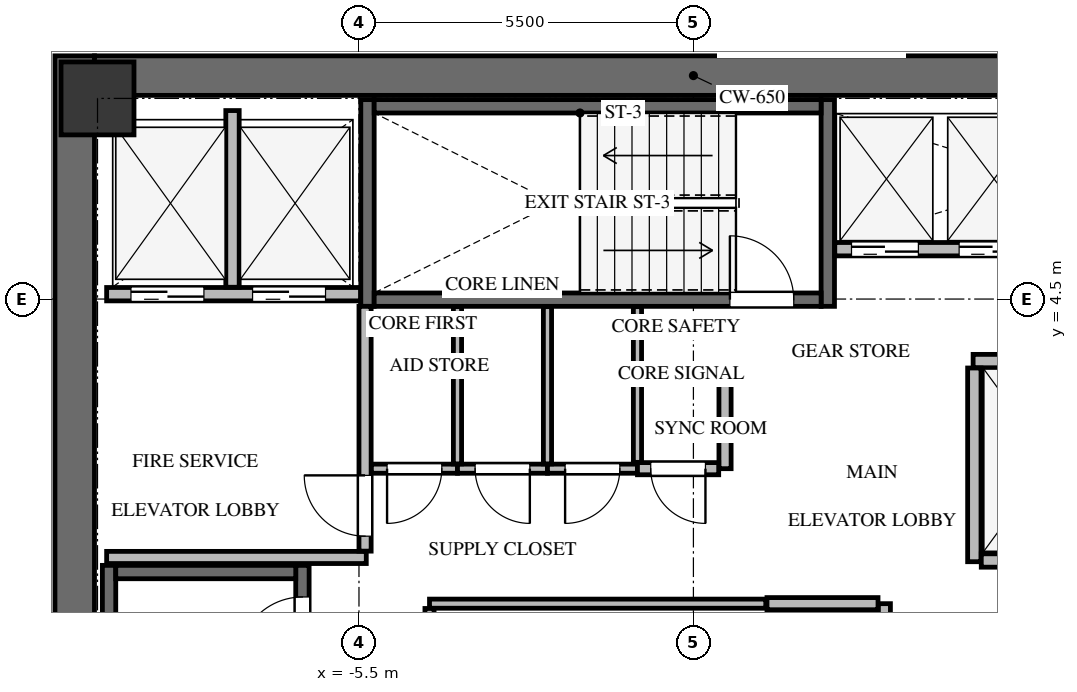
"""IFC4 building model, lengths in metres.
Left out: names, types, materials, properties, quantities, classifications, styles, units other than length and angle.
Written with IfcOpenShell. Run it as: python <this file> out.ifc"""

import sys

from ifc_helpers import new_model, si_unit, direction, frame, frame_2d, origin, origin_2d, place, context, subcontext, project, spatial, rectangle, extrude, source, transform, mapped, element, fill, save


model = new_model("IFC4")
c1 = context("Model", 3, precision=1e-05, world=origin(), true_north=direction((0.0, 1.0)))
c2 = subcontext(c1, "Body", "Model", "MODEL_VIEW")
j1 = project(units=[si_unit("LENGTHUNIT", "METRE"), si_unit("PLANEANGLEUNIT", "RADIAN")], contexts=[c1])
p1 = place(None, origin())
s1 = spatial("IfcSite", under=j1, at=p1, CompositionType="ELEMENT")
p2 = place(p1, origin())
s2 = spatial("IfcBuilding", under=s1, at=p2, CompositionType="ELEMENT")
p3 = place(p2, frame((0.0, 0.0, 167.2)))
s3 = spatial("IfcBuildingStorey", under=s2, at=p3, CompositionType="ELEMENT", Elevation=167.2)
p4 = place(p3, frame((-10.175, -8.5, 0.0), z_axis=(0.0, 0.0, 1.0), x_axis=(0.0, 1.0, 0.0)))
e1 = element("IfcWall", 1, at=p4, inside=s3, PredefinedType="SHEAR", context=c2, shape_type="SweptSolid", body=[
    extrude(rectangle(XDim=17.0, YDim=0.65, at=frame_2d((8.5, 0.0))), origin(), (0.0, 0.0, 1.0), 3.3),
])
p5 = place(p3, frame((-9.85, 8.175, 0.0), z_axis=(0.0, 0.0, 1.0), x_axis=(1.0, 0.0, 0.0)))
e2 = element("IfcWall", 2, at=p5, inside=s3, PredefinedType="SHEAR", context=c2, shape_type="SweptSolid", body=[
    extrude(rectangle(XDim=19.7, YDim=0.65, at=frame_2d((9.85, 0.0))), origin(), (0.0, 0.0, 1.0), 3.3),
])
p6 = place(p3, frame((-6.43, -7.77, -0.24), z_axis=(0.0, 0.0, 1.0), x_axis=(0.0, 1.0, 0.0)))
e3 = element("IfcWall", 3, at=p6, inside=s3, PredefinedType="SHEAR", context=c2, shape_type="SweptSolid", body=[
    extrude(rectangle(XDim=7.89, YDim=0.22, at=frame_2d((3.945, 0.0))), origin(), (0.0, 0.0, 1.0), 3.3),
])
p7 = place(p6, frame((6.32, 0.0, 0.0)))
e4 = element("IfcOpeningElement", 4, at=p7, cuts=e3, PredefinedType="OPENING", context=c2, shape_type="SweptSolid", body=[
    extrude(rectangle(XDim=1.05, YDim=2.15, at=frame_2d((0.525, 1.075))), frame((0.0, 0.12, 0.0), z_axis=(0.0, -1.0, 0.0), x_axis=(1.0, 0.0, 0.0)), (0.0, 0.0, 1.0), 0.24),
])
p8 = place(p3, frame((-9.61, 0.12, -0.24), z_axis=(0.0, 0.0, 1.0), x_axis=(0.0, -1.0, 0.0)))
e5 = element("IfcWall", 5, at=p8, inside=s3, PredefinedType="SHEAR", context=c2, shape_type="SweptSolid", body=[
    extrude(rectangle(XDim=7.89, YDim=0.22, at=frame_2d((3.945, 0.0))), origin(), (0.0, 0.0, 1.0), 3.3),
])
p9 = place(p3, frame((-6.54, 0.01, -0.24), z_axis=(0.0, 0.0, 1.0), x_axis=(-1.0, 0.0, 0.0)))
e6 = element("IfcWall", 6, at=p9, inside=s3, PredefinedType="SHEAR", context=c2, shape_type="SweptSolid", body=[
    extrude(rectangle(XDim=2.96, YDim=0.22, at=frame_2d((1.48, 0.0))), origin(), (0.0, 0.0, 1.0), 3.3),
])
for number, where, z_axis, x_axis in (
    (7, (2.21, 4.38, -0.24), (0.0, 0.0, 1.0), (0.0, 1.0, 0.0)),
    (8, (-5.36, 7.78, -0.24), (0.0, 0.0, 1.0), (0.0, -1.0, 0.0)),
):
    element("IfcWall", number, at=place(p3, frame(where, z_axis=z_axis, x_axis=x_axis)), inside=s3, PredefinedType="SHEAR", context=c2, shape_type="SweptSolid", body=[
        extrude(rectangle(XDim=3.4, YDim=0.22, at=frame_2d((1.7, 0.0))), origin(), (0.0, 0.0, 1.0), 3.3),
    ])
p10 = place(p3, frame((-5.25, 4.49, -0.24), z_axis=(0.0, 0.0, 1.0), x_axis=(1.0, 0.0, 0.0)))
e9 = element("IfcWall", 9, at=p10, inside=s3, PredefinedType="SHEAR", context=c2, shape_type="SweptSolid", body=[
    extrude(rectangle(XDim=7.35, YDim=0.22, at=frame_2d((3.675, 0.0))), origin(), (0.0, 0.0, 1.0), 3.3),
])
p11 = place(p10, frame((5.85, 0.0, 0.0)))
e10 = element("IfcOpeningElement", 10, at=p11, cuts=e9, PredefinedType="OPENING", context=c2, shape_type="SweptSolid", body=[
    extrude(rectangle(XDim=1.05, YDim=2.15, at=frame_2d((0.525, 1.075))), frame((0.0, 0.12, 0.0), z_axis=(0.0, -1.0, 0.0), x_axis=(1.0, 0.0, 0.0)), (0.0, 0.0, 1.0), 0.24),
])
p12 = place(p3, frame((2.1, 7.67, -0.24), z_axis=(0.0, 0.0, 1.0), x_axis=(-1.0, 0.0, 0.0)))
e11 = element("IfcWall", 11, at=p12, inside=s3, PredefinedType="SHEAR", context=c2, shape_type="SweptSolid", body=[
    extrude(rectangle(XDim=7.35, YDim=0.22, at=frame_2d((3.675, 0.0))), origin(), (0.0, 0.0, 1.0), 3.3),
])
m1 = source(origin(), c2, "Body", "SweptSolid", [
    extrude(rectangle(XDim=1.2, YDim=1.2, at=origin_2d()), origin(), (0.0, 0.0, 1.0), 3.3),
])
p13 = place(p3, frame((-9.8, 7.8, -0.24), z_axis=(0.0, 0.0, 1.0), x_axis=(1.0, 0.0, 0.0)))
e12 = element("IfcColumn", 12, at=p13, inside=s3, PredefinedType="COLUMN", context=c2, shape_type="MappedRepresentation", body=[
    mapped(m1, transform((0.0, 0.0, 0.0), x_axis=(1.0, 0.0, 0.0), y_axis=(0.0, 1.0, 0.0), z_axis=(0.0, 0.0, 1.0), scale=1.0)),
])
p14 = place(p3, frame((-9.65, 4.58, 0.0), z_axis=(0.0, 0.0, 1.0), x_axis=(1.0, 0.0, 0.0)))
e13 = element("IfcWall", 13, at=p14, inside=s3, PredefinedType="SOLIDWALL", context=c2, shape_type="SweptSolid", body=[
    extrude(rectangle(XDim=4.175, YDim=0.22, at=frame_2d((2.087, 0.0))), origin(), (0.0, 0.0, 1.0), 3.045),
])
p15 = place(p14, frame((0.4, 0.0, 0.0)))
e14 = element("IfcOpeningElement", 14, at=p15, cuts=e13, PredefinedType="OPENING", context=c2, shape_type="SweptSolid", body=[
    extrude(rectangle(XDim=1.2, YDim=2.15, at=frame_2d((0.6, 1.075))), frame((0.0, 0.12, 0.0), z_axis=(0.0, -1.0, 0.0), x_axis=(1.0, 0.0, 0.0)), (0.0, 0.0, 1.0), 0.24),
])
p16 = place(p14, frame((2.4, 0.0, 0.0)))
e15 = element("IfcOpeningElement", 15, at=p16, cuts=e13, PredefinedType="OPENING", context=c2, shape_type="SweptSolid", body=[
    extrude(rectangle(XDim=1.2, YDim=2.15, at=frame_2d((0.6, 1.075))), frame((0.0, 0.12, 0.0), z_axis=(0.0, -1.0, 0.0), x_axis=(1.0, 0.0, 0.0)), (0.0, 0.0, 1.0), 0.24),
])
p17 = place(p3, frame((-7.58, 4.694, 0.0), z_axis=(0.0, 0.0, 1.0), x_axis=(0.0, 1.0, 0.0)))
e16 = element("IfcWall", 16, at=p17, inside=s3, PredefinedType="SOLIDWALL", context=c2, shape_type="SweptSolid", body=[
    extrude(rectangle(XDim=2.906, YDim=0.22, at=frame_2d((1.453, 0.0))), origin(), (0.0, 0.0, 1.0), 3.045),
])
p18 = place(p3, frame((-9.65, 0.25, 0.0), z_axis=(0.0, 0.0, 1.0), x_axis=(1.0, 0.0, 0.0)))
e17 = element("IfcWall", 17, at=p18, inside=s3, PredefinedType="SOLIDWALL", context=c2, shape_type="SweptSolid", body=[
    extrude(rectangle(XDim=4.27, YDim=0.2, at=frame_2d((2.135, 0.0))), origin(), (0.0, 0.0, 1.0), 3.045),
])
p19 = place(p3, frame((-5.4, 0.354, 0.0), z_axis=(0.0, 0.0, 1.0), x_axis=(0.0, 1.0, 0.0)))
e18 = element("IfcWall", 18, at=p19, inside=s3, PredefinedType="SOLIDWALL", context=c2, shape_type="SweptSolid", body=[
    extrude(rectangle(XDim=4.026, YDim=0.2, at=frame_2d((2.013, 0.0))), origin(), (0.0, 0.0, 1.0), 3.045),
])
p20 = place(p19, frame((0.246, 0.0, 0.0)))
e19 = element("IfcOpeningElement", 19, at=p20, cuts=e18, PredefinedType="OPENING", context=c2, shape_type="SweptSolid", body=[
    extrude(rectangle(XDim=1.0, YDim=2.15, at=frame_2d((0.5, 1.075))), frame((0.0, 0.11, 0.0), z_axis=(0.0, -1.0, 0.0), x_axis=(1.0, 0.0, 0.0)), (0.0, 0.0, 1.0), 0.22),
])
p21 = place(p3, frame((4.6, 3.48, 0.0), z_axis=(0.0, 0.0, 1.0), x_axis=(1.0, 0.0, 0.0)))
e20 = element("IfcWall", 20, at=p21, inside=s3, PredefinedType="SOLIDWALL", context=c2, shape_type="SweptSolid", body=[
    extrude(rectangle(XDim=5.05, YDim=0.22, at=frame_2d((2.525, 0.0))), origin(), (0.0, 0.0, 1.0), 3.045),
])
p22 = place(p21, frame((0.55, 0.0, 0.0)))
e21 = element("IfcOpeningElement", 21, at=p22, cuts=e20, PredefinedType="OPENING", context=c2, shape_type="SweptSolid", body=[
    extrude(rectangle(XDim=1.4, YDim=2.15, at=frame_2d((0.7, 1.075))), frame((0.0, 0.12, 0.0), z_axis=(0.0, -1.0, 0.0), x_axis=(1.0, 0.0, 0.0)), (0.0, 0.0, 1.0), 0.24),
])
p23 = place(p21, frame((3.05, 0.0, 0.0)))
e22 = element("IfcOpeningElement", 22, at=p23, cuts=e20, PredefinedType="OPENING", context=c2, shape_type="SweptSolid", body=[
    extrude(rectangle(XDim=1.4, YDim=2.15, at=frame_2d((0.7, 1.075))), frame((0.0, 0.12, 0.0), z_axis=(0.0, -1.0, 0.0), x_axis=(1.0, 0.0, 0.0)), (0.0, 0.0, 1.0), 0.24),
])
p24 = place(p3, frame((4.62, 0.18, 0.0), z_axis=(0.0, 0.0, 1.0), x_axis=(0.0, 1.0, 0.0)))
e23 = element("IfcWall", 23, at=p24, inside=s3, PredefinedType="SOLIDWALL", context=c2, shape_type="SweptSolid", body=[
    extrude(rectangle(XDim=3.186, YDim=0.22, at=frame_2d((1.593, 0.0))), origin(), (0.0, 0.0, 1.0), 3.045),
])
p25 = place(p3, frame((4.734, 0.2, 0.0), z_axis=(0.0, 0.0, 1.0), x_axis=(1.0, 0.0, 0.0)))
e24 = element("IfcWall", 24, at=p25, inside=s3, PredefinedType="SOLIDWALL", context=c2, shape_type="SweptSolid", body=[
    extrude(rectangle(XDim=1.666, YDim=0.22, at=frame_2d((0.833, 0.0))), origin(), (0.0, 0.0, 1.0), 3.045),
])
p26 = place(p3, frame((2.325, 5.32, 0.0), z_axis=(0.0, 0.0, 1.0), x_axis=(1.0, 0.0, 0.0)))
e25 = element("IfcWall", 25, at=p26, inside=s3, PredefinedType="SOLIDWALL", context=c2, shape_type="SweptSolid", body=[
    extrude(rectangle(XDim=7.325, YDim=0.22, at=frame_2d((3.663, 0.0))), origin(), (0.0, 0.0, 1.0), 3.045),
])
p27 = place(p26, frame((0.275, 0.0, 0.0)))
e26 = element("IfcOpeningElement", 26, at=p27, cuts=e25, PredefinedType="OPENING", context=c2, shape_type="SweptSolid", body=[
    extrude(rectangle(XDim=1.1, YDim=2.15, at=frame_2d((0.55, 1.075))), frame((0.0, 0.12, 0.0), z_axis=(0.0, -1.0, 0.0), x_axis=(1.0, 0.0, 0.0)), (0.0, 0.0, 1.0), 0.24),
])
p28 = place(p26, frame((2.045, 0.0, 0.0)))
e27 = element("IfcOpeningElement", 27, at=p28, cuts=e25, PredefinedType="OPENING", context=c2, shape_type="SweptSolid", body=[
    extrude(rectangle(XDim=1.1, YDim=2.15, at=frame_2d((0.55, 1.075))), frame((0.0, 0.12, 0.0), z_axis=(0.0, -1.0, 0.0), x_axis=(1.0, 0.0, 0.0)), (0.0, 0.0, 1.0), 0.24),
])
p29 = place(p26, frame((3.815, 0.0, 0.0)))
e28 = element("IfcOpeningElement", 28, at=p29, cuts=e25, PredefinedType="OPENING", context=c2, shape_type="SweptSolid", body=[
    extrude(rectangle(XDim=1.1, YDim=2.15, at=frame_2d((0.55, 1.075))), frame((0.0, 0.12, 0.0), z_axis=(0.0, -1.0, 0.0), x_axis=(1.0, 0.0, 0.0)), (0.0, 0.0, 1.0), 0.24),
])
p30 = place(p26, frame((5.585, 0.0, 0.0)))
e29 = element("IfcOpeningElement", 29, at=p30, cuts=e25, PredefinedType="OPENING", context=c2, shape_type="SweptSolid", body=[
    extrude(rectangle(XDim=1.1, YDim=2.15, at=frame_2d((0.55, 1.075))), frame((0.0, 0.12, 0.0), z_axis=(0.0, -1.0, 0.0), x_axis=(1.0, 0.0, 0.0)), (0.0, 0.0, 1.0), 0.24),
])
p31 = place(p3, frame((-4.34, -0.51, 0.0), z_axis=(0.0, 0.0, 1.0), x_axis=(1.0, 0.0, 0.0)))
e30 = element("IfcWall", 30, at=p31, inside=s3, PredefinedType="PARTITIONING", context=c2, shape_type="SweptSolid", body=[
    extrude(rectangle(XDim=5.53, YDim=0.15, at=frame_2d((2.765, 0.0))), origin(), (0.0, 0.0, 1.0), 3.045),
])
p32 = place(p3, frame((-4.34, -2.961, 0.0), z_axis=(0.0, 0.0, 1.0), x_axis=(0.0, 1.0, 0.0)))
e31 = element("IfcWall", 31, at=p32, inside=s3, PredefinedType="PARTITIONING", context=c2, shape_type="SweptSolid", body=[
    extrude(rectangle(XDim=2.372, YDim=0.15, at=frame_2d((1.186, 0.0))), origin(), (0.0, 0.0, 1.0), 3.045),
])
p33 = place(p3, frame((3.14, -0.51, 0.0), z_axis=(0.0, 0.0, 1.0), x_axis=(0.0, -1.0, 0.0)))
e32 = element("IfcWall", 32, at=p33, inside=s3, PredefinedType="SOLIDWALL", context=c2, shape_type="SweptSolid", body=[
    extrude(rectangle(XDim=2.53, YDim=0.2, at=frame_2d((1.265, 0.0))), origin(), (0.0, 0.0, 1.0), 3.045),
])
p34 = place(p33, frame((0.815, 0.0, 0.0)))
e33 = element("IfcOpeningElement", 33, at=p34, cuts=e32, PredefinedType="OPENING", context=c2, shape_type="SweptSolid", body=[
    extrude(rectangle(XDim=0.9, YDim=2.05, at=frame_2d((0.45, 1.025))), frame((0.0, 0.11, 0.0), z_axis=(0.0, -1.0, 0.0), x_axis=(1.0, 0.0, 0.0)), (0.0, 0.0, 1.0), 0.22),
])
p35 = place(p3, frame((1.21, -0.51, 0.0), z_axis=(0.0, 0.0, 1.0), x_axis=(1.0, 0.0, 0.0)))
e34 = element("IfcWall", 34, at=p35, inside=s3, PredefinedType="SOLIDWALL", context=c2, shape_type="SweptSolid", body=[
    extrude(rectangle(XDim=1.826, YDim=0.2, at=frame_2d((0.913, 0.0))), origin(), (0.0, 0.0, 1.0), 3.045),
])
p36 = place(p3, frame((-3.88, 1.71, 0.0), z_axis=(0.0, 0.0, 1.0), x_axis=(-1.0, 0.0, 0.0)))
e35 = element("IfcWall", 35, at=p36, inside=s3, PredefinedType="PARTITIONING", context=c2, shape_type="SweptSolid", body=[
    extrude(rectangle(XDim=1.416, YDim=0.15, at=frame_2d((0.708, 0.0))), origin(), (0.0, 0.0, 1.0), 3.045),
])
p37 = place(p36, frame((0.258, 0.0, 0.0)))
e36 = element("IfcOpeningElement", 36, at=p37, cuts=e35, PredefinedType="OPENING", context=c2, shape_type="SweptSolid", body=[
    extrude(rectangle(XDim=0.9, YDim=2.05, at=frame_2d((0.45, 1.025))), frame((0.0, 0.085, 0.0), z_axis=(0.0, -1.0, 0.0), x_axis=(1.0, 0.0, 0.0)), (0.0, 0.0, 1.0), 0.17),
])
p38 = place(p3, frame((-2.4, 1.71, 0.0), z_axis=(0.0, 0.0, 1.0), x_axis=(-1.0, 0.0, 0.0)))
e37 = element("IfcWall", 37, at=p38, inside=s3, PredefinedType="PARTITIONING", context=c2, shape_type="SweptSolid", body=[
    extrude(rectangle(XDim=1.48, YDim=0.15, at=frame_2d((0.74, 0.0))), origin(), (0.0, 0.0, 1.0), 3.045),
])
p39 = place(p38, frame((0.29, 0.0, 0.0)))
e38 = element("IfcOpeningElement", 38, at=p39, cuts=e37, PredefinedType="OPENING", context=c2, shape_type="SweptSolid", body=[
    extrude(rectangle(XDim=0.9, YDim=2.05, at=frame_2d((0.45, 1.025))), frame((0.0, 0.085, 0.0), z_axis=(0.0, -1.0, 0.0), x_axis=(1.0, 0.0, 0.0)), (0.0, 0.0, 1.0), 0.17),
])
p40 = place(p3, frame((-0.92, 1.71, 0.0), z_axis=(0.0, 0.0, 1.0), x_axis=(-1.0, 0.0, 0.0)))
e39 = element("IfcWall", 39, at=p40, inside=s3, PredefinedType="PARTITIONING", context=c2, shape_type="SweptSolid", body=[
    extrude(rectangle(XDim=1.48, YDim=0.15, at=frame_2d((0.74, 0.0))), origin(), (0.0, 0.0, 1.0), 3.045),
])
p41 = place(p40, frame((0.29, 0.0, 0.0)))
e40 = element("IfcOpeningElement", 40, at=p41, cuts=e39, PredefinedType="OPENING", context=c2, shape_type="SweptSolid", body=[
    extrude(rectangle(XDim=0.9, YDim=2.05, at=frame_2d((0.45, 1.025))), frame((0.0, 0.085, 0.0), z_axis=(0.0, -1.0, 0.0), x_axis=(1.0, 0.0, 0.0)), (0.0, 0.0, 1.0), 0.17),
])
p42 = place(p3, frame((0.52, 3.3, 0.0), z_axis=(0.0, 0.0, 1.0), x_axis=(0.0, -1.0, 0.0)))
e41 = element("IfcWall", 41, at=p42, inside=s3, PredefinedType="SOLIDWALL", context=c2, shape_type="SweptSolid", body=[
    extrude(rectangle(XDim=1.59, YDim=0.2, at=frame_2d((0.795, 0.0))), origin(), (0.0, 0.0, 1.0), 3.045),
])
p43 = place(p3, frame((0.416, 1.71, 0.0), z_axis=(0.0, 0.0, 1.0), x_axis=(-1.0, 0.0, 0.0)))
e42 = element("IfcWall", 42, at=p43, inside=s3, PredefinedType="SOLIDWALL", context=c2, shape_type="SweptSolid", body=[
    extrude(rectangle(XDim=1.336, YDim=0.2, at=frame_2d((0.668, 0.0))), origin(), (0.0, 0.0, 1.0), 3.045),
])
p44 = place(p43, frame((0.218, 0.0, 0.0)))
e43 = element("IfcOpeningElement", 43, at=p44, cuts=e42, PredefinedType="OPENING", context=c2, shape_type="SweptSolid", body=[
    extrude(rectangle(XDim=0.9, YDim=2.05, at=frame_2d((0.45, 1.025))), frame((0.0, 0.11, 0.0), z_axis=(0.0, -1.0, 0.0), x_axis=(1.0, 0.0, 0.0)), (0.0, 0.0, 1.0), 0.22),
])
for number, where, z_axis, x_axis in (
    (44, (-3.88, 4.375, 0.0), (0.0, 0.0, 1.0), (0.0, -1.0, 0.0)),
    (45, (-2.4, 4.375, 0.0), (0.0, 0.0, 1.0), (0.0, -1.0, 0.0)),
):
    element("IfcWall", number, at=place(p3, frame(where, z_axis=z_axis, x_axis=x_axis)), inside=s3, PredefinedType="PARTITIONING", context=c2, shape_type="SweptSolid", body=[
        extrude(rectangle(XDim=2.586, YDim=0.135, at=frame_2d((1.293, 0.0))), origin(), (0.0, 0.0, 1.0), 3.045),
    ])
p45 = place(p3, frame((-0.92, 4.375, 0.0), z_axis=(0.0, 0.0, 1.0), x_axis=(0.0, -1.0, 0.0)))
e46 = element("IfcWall", 46, at=p45, inside=s3, PredefinedType="PARTITIONING", context=c2, shape_type="SweptSolid", body=[
    extrude(rectangle(XDim=2.561, YDim=0.135, at=frame_2d((1.281, 0.0))), origin(), (0.0, 0.0, 1.0), 3.045),
])
m2 = source(origin(), c2, "Body", "SweptSolid", [
    extrude(rectangle(XDim=1.05, YDim=2.15, at=frame_2d((0.525, 1.075))), frame((0.0, 0.025, 0.0), z_axis=(0.0, -1.0, 0.0), x_axis=(1.0, 0.0, 0.0)), (0.0, 0.0, 1.0), 0.05),
])
p46 = place(p7, origin())
e47 = element("IfcDoor", 47, at=p46, inside=s3, OperationType="SINGLE_SWING_LEFT", PredefinedType="DOOR", context=c2, shape_type="MappedRepresentation", body=[
    mapped(m2, transform((0.0, 0.0, 0.0), x_axis=(1.0, 0.0, 0.0), y_axis=(0.0, 1.0, 0.0), z_axis=(0.0, 0.0, 1.0), scale=1.0)),
])
fill(e4, e47)
p47 = place(p11, origin())
e48 = element("IfcDoor", 48, at=p47, inside=s3, OperationType="SINGLE_SWING_LEFT", PredefinedType="DOOR", context=c2, shape_type="MappedRepresentation", body=[
    mapped(m2, transform((0.0, 0.0, 0.0), x_axis=(1.0, 0.0, 0.0), y_axis=(0.0, 1.0, 0.0), z_axis=(0.0, 0.0, 1.0), scale=1.0)),
])
fill(e10, e48)
m3 = source(origin(), c2, "Body", "SweptSolid", [
    extrude(rectangle(XDim=1.2, YDim=2.15, at=frame_2d((0.6, 1.075))), frame((0.0, 0.025, 0.0), z_axis=(0.0, -1.0, 0.0), x_axis=(1.0, 0.0, 0.0)), (0.0, 0.0, 1.0), 0.05),
])
p48 = place(p15, origin())
e49 = element("IfcDoor", 49, at=p48, inside=s3, OperationType="DOUBLE_DOOR_SLIDING", PredefinedType="DOOR", context=c2, shape_type="MappedRepresentation", body=[
    mapped(m3, transform((0.0, 0.0, 0.0), x_axis=(1.0, 0.0, 0.0), y_axis=(0.0, 1.0, 0.0), z_axis=(0.0, 0.0, 1.0), scale=1.0)),
])
fill(e14, e49)
p49 = place(p16, origin())
e50 = element("IfcDoor", 50, at=p49, inside=s3, OperationType="DOUBLE_DOOR_SLIDING", PredefinedType="DOOR", context=c2, shape_type="MappedRepresentation", body=[
    mapped(m3, transform((0.0, 0.0, 0.0), x_axis=(1.0, 0.0, 0.0), y_axis=(0.0, 1.0, 0.0), z_axis=(0.0, 0.0, 1.0), scale=1.0)),
])
fill(e15, e50)
m4 = source(origin(), c2, "Body", "SweptSolid", [
    extrude(rectangle(XDim=1.0, YDim=2.15, at=frame_2d((0.5, 1.075))), frame((0.0, 0.025, 0.0), z_axis=(0.0, -1.0, 0.0), x_axis=(1.0, 0.0, 0.0)), (0.0, 0.0, 1.0), 0.05),
])
p50 = place(p20, origin())
e51 = element("IfcDoor", 51, at=p50, inside=s3, OperationType="SINGLE_SWING_RIGHT", PredefinedType="DOOR", context=c2, shape_type="MappedRepresentation", body=[
    mapped(m4, transform((0.0, 0.0, 0.0), x_axis=(1.0, 0.0, 0.0), y_axis=(0.0, 1.0, 0.0), z_axis=(0.0, 0.0, 1.0), scale=1.0)),
])
fill(e19, e51)
m5 = source(origin(), c2, "Body", "SweptSolid", [
    extrude(rectangle(XDim=1.1, YDim=2.15, at=frame_2d((0.55, 1.075))), frame((0.0, 0.025, 0.0), z_axis=(0.0, -1.0, 0.0), x_axis=(1.0, 0.0, 0.0)), (0.0, 0.0, 1.0), 0.05),
])
p51 = place(p27, origin())
e52 = element("IfcDoor", 52, at=p51, inside=s3, OperationType="DOUBLE_DOOR_SLIDING", PredefinedType="DOOR", context=c2, shape_type="MappedRepresentation", body=[
    mapped(m5, transform((0.0, 0.0, 0.0), x_axis=(1.0, 0.0, 0.0), y_axis=(0.0, 1.0, 0.0), z_axis=(0.0, 0.0, 1.0), scale=1.0)),
])
fill(e26, e52)
p52 = place(p28, origin())
e53 = element("IfcDoor", 53, at=p52, inside=s3, OperationType="DOUBLE_DOOR_SLIDING", PredefinedType="DOOR", context=c2, shape_type="MappedRepresentation", body=[
    mapped(m5, transform((0.0, 0.0, 0.0), x_axis=(1.0, 0.0, 0.0), y_axis=(0.0, 1.0, 0.0), z_axis=(0.0, 0.0, 1.0), scale=1.0)),
])
fill(e27, e53)
m6 = source(origin(), c2, "Body", "SweptSolid", [
    extrude(rectangle(XDim=0.9, YDim=2.05, at=frame_2d((0.45, 1.025))), frame((0.0, 0.025, 0.0), z_axis=(0.0, -1.0, 0.0), x_axis=(1.0, 0.0, 0.0)), (0.0, 0.0, 1.0), 0.05),
])
p53 = place(p37, origin())
e54 = element("IfcDoor", 54, at=p53, inside=s3, OperationType="SINGLE_SWING_RIGHT", PredefinedType="DOOR", context=c2, shape_type="MappedRepresentation", body=[
    mapped(m6, transform((0.0, 0.0, 0.0), x_axis=(1.0, 0.0, 0.0), y_axis=(0.0, 1.0, 0.0), z_axis=(0.0, 0.0, 1.0), scale=1.0)),
])
fill(e36, e54)
m7 = source(origin(), c2, "Body", "SweptSolid", [
    extrude(rectangle(XDim=0.9, YDim=2.05, at=frame_2d((0.45, 1.025))), frame((0.0, 0.025, 0.0), z_axis=(0.0, -1.0, 0.0), x_axis=(1.0, 0.0, 0.0)), (0.0, 0.0, 1.0), 0.05),
])
p54 = place(p39, origin())
e55 = element("IfcDoor", 55, at=p54, inside=s3, OperationType="SINGLE_SWING_LEFT", PredefinedType="DOOR", context=c2, shape_type="MappedRepresentation", body=[
    mapped(m7, transform((0.0, 0.0, 0.0), x_axis=(1.0, 0.0, 0.0), y_axis=(0.0, 1.0, 0.0), z_axis=(0.0, 0.0, 1.0), scale=1.0)),
])
fill(e38, e55)
p55 = place(p41, origin())
e56 = element("IfcDoor", 56, at=p55, inside=s3, OperationType="SINGLE_SWING_RIGHT", PredefinedType="DOOR", context=c2, shape_type="MappedRepresentation", body=[
    mapped(m6, transform((0.0, 0.0, 0.0), x_axis=(1.0, 0.0, 0.0), y_axis=(0.0, 1.0, 0.0), z_axis=(0.0, 0.0, 1.0), scale=1.0)),
])
fill(e40, e56)
p56 = place(p44, origin())
e57 = element("IfcDoor", 57, at=p56, inside=s3, OperationType="SINGLE_SWING_LEFT", PredefinedType="DOOR", context=c2, shape_type="MappedRepresentation", body=[
    mapped(m7, transform((0.0, 0.0, 0.0), x_axis=(1.0, 0.0, 0.0), y_axis=(0.0, 1.0, 0.0), z_axis=(0.0, 0.0, 1.0), scale=1.0)),
])
fill(e43, e57)
save(model, sys.argv[1])
